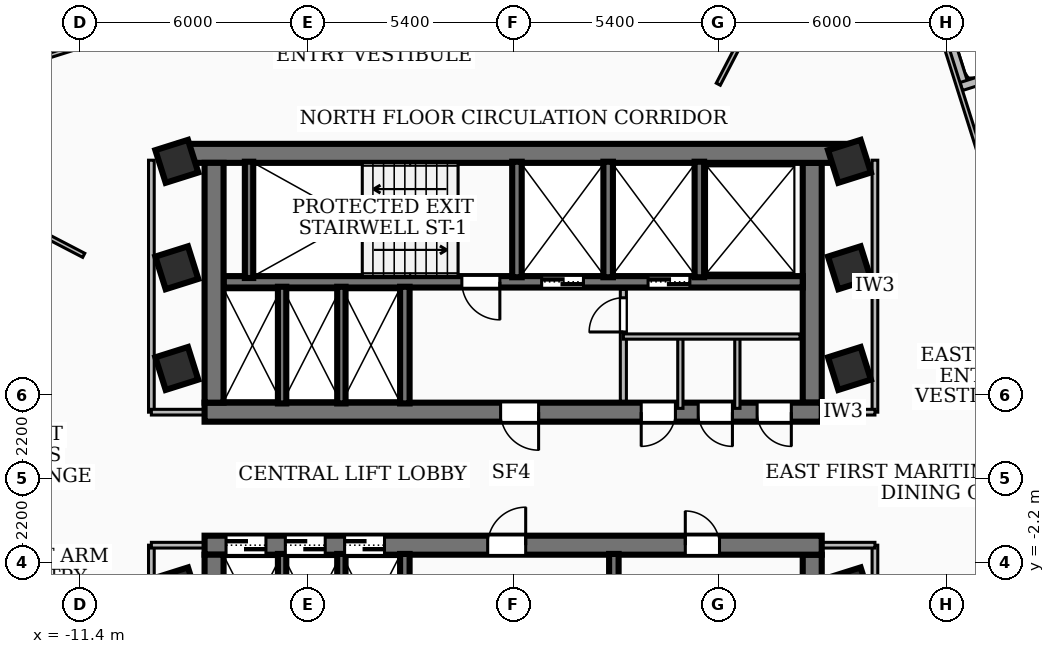
"""IFC4 building model, lengths in metres.
Left out: names, types, materials, properties, quantities, classifications, styles, units other than length and angle.
Written with IfcOpenShell. Run it as: python <this file> out.ifc"""

import sys

from ifc_helpers import new_model, si_unit, direction, frame, frame_2d, origin, origin_2d, place, context, subcontext, project, spatial, rectangle, extrude, element, fill, save


model = new_model("IFC4")
c1 = context("Model", 3, precision=1e-05, world=origin(), true_north=direction((0.0, 1.0)))
c2 = subcontext(c1, "Body", "Model", "MODEL_VIEW")
j1 = project(units=[si_unit("LENGTHUNIT", "METRE"), si_unit("PLANEANGLEUNIT", "RADIAN")], contexts=[c1])
p1 = place(None, origin())
s1 = spatial("IfcSite", under=j1, at=p1, CompositionType="ELEMENT")
p2 = place(p1, origin())
s2 = spatial("IfcBuilding", under=s1, at=p2, CompositionType="ELEMENT")
p3 = place(p2, frame((0.0, 0.0, 152.28)))
s3 = spatial("IfcBuildingStorey", under=s2, at=p3, CompositionType="ELEMENT", Elevation=152.28)
p4 = place(p3, frame((-8.78, 8.56, 0.0), z_axis=(0.0, 0.0, 1.0), x_axis=(1.0, 0.0, 0.0)))
e1 = element("IfcWall", 1, at=p4, inside=s3, PredefinedType="SHEAR", context=c2, shape_type="SweptSolid", body=[
    extrude(rectangle(XDim=17.56, YDim=0.5, at=frame_2d((8.78, 0.0))), origin(), (0.0, 0.0, 1.0), 3.34),
])
p5 = place(p3, frame((8.12, 1.75, 0.0), z_axis=(0.0, 0.0, 1.0), x_axis=(-1.0, 0.0, 0.0)))
e2 = element("IfcWall", 2, at=p5, inside=s3, PredefinedType="SHEAR", context=c2, shape_type="SweptSolid", body=[
    extrude(rectangle(XDim=16.24, YDim=0.5, at=frame_2d((8.12, 0.0))), origin(), (0.0, 0.0, 1.0), 3.34),
])
p6 = place(p5, frame((7.45, 0.0, 0.0)))
e3 = element("IfcOpeningElement", 3, at=p6, cuts=e2, PredefinedType="OPENING", context=c2, shape_type="SweptSolid", body=[
    extrude(rectangle(XDim=1.0, YDim=2.1, at=frame_2d((0.5, 1.05))), frame((0.0, 0.26, 0.0), z_axis=(0.0, -1.0, 0.0), x_axis=(1.0, 0.0, 0.0)), (0.0, 0.0, 1.0), 0.52),
])
p7 = place(p5, frame((3.85, 0.0, 0.0)))
e4 = element("IfcOpeningElement", 4, at=p7, cuts=e2, PredefinedType="OPENING", context=c2, shape_type="SweptSolid", body=[
    extrude(rectangle(XDim=0.9, YDim=2.06, at=frame_2d((0.45, 1.03))), frame((0.0, 0.26, 0.0), z_axis=(0.0, -1.0, 0.0), x_axis=(1.0, 0.0, 0.0)), (0.0, 0.0, 1.0), 0.52),
])
p8 = place(p5, frame((2.35, 0.0, 0.0)))
e5 = element("IfcOpeningElement", 5, at=p8, cuts=e2, PredefinedType="OPENING", context=c2, shape_type="SweptSolid", body=[
    extrude(rectangle(XDim=0.9, YDim=2.06, at=frame_2d((0.45, 1.03))), frame((0.0, 0.26, 0.0), z_axis=(0.0, -1.0, 0.0), x_axis=(1.0, 0.0, 0.0)), (0.0, 0.0, 1.0), 0.52),
])
p9 = place(p5, frame((0.8, 0.0, 0.0)))
e6 = element("IfcOpeningElement", 6, at=p9, cuts=e2, PredefinedType="OPENING", context=c2, shape_type="SweptSolid", body=[
    extrude(rectangle(XDim=0.9, YDim=2.06, at=frame_2d((0.45, 1.03))), frame((0.0, 0.26, 0.0), z_axis=(0.0, -1.0, 0.0), x_axis=(1.0, 0.0, 0.0)), (0.0, 0.0, 1.0), 0.52),
])
for number, where, z_axis, x_axis in (
    (7, (-7.87, 2.0, 0.0), (0.0, 0.0, 1.0), (0.0, 1.0, 0.0)),
    (8, (7.87, 8.31, 0.0), (0.0, 0.0, 1.0), (0.0, -1.0, 0.0)),
):
    element("IfcWall", number, at=place(p3, frame(where, z_axis=z_axis, x_axis=x_axis)), inside=s3, PredefinedType="SHEAR", context=c2, shape_type="SweptSolid", body=[
        extrude(rectangle(XDim=6.31, YDim=0.5, at=frame_2d((3.155, 0.0))), origin(), (0.0, 0.0, 1.0), 3.34),
    ])
p10 = place(p3, frame((7.62, 5.18, 0.0), z_axis=(0.0, 0.0, 1.0), x_axis=(-1.0, 0.0, 0.0)))
e9 = element("IfcWall", 9, at=p10, inside=s3, PredefinedType="SOLIDWALL", context=c2, shape_type="SweptSolid", body=[
    extrude(rectangle(XDim=15.24, YDim=0.3, at=frame_2d((7.62, 0.0))), origin(), (0.0, 0.0, 1.0), 3.34),
])
p11 = place(p10, frame((5.77, 0.0, 0.0)))
e10 = element("IfcOpeningElement", 10, at=p11, cuts=e9, PredefinedType="OPENING", context=c2, shape_type="SweptSolid", body=[
    extrude(rectangle(XDim=1.1, YDim=2.15, at=frame_2d((0.55, 1.075))), frame((0.0, 0.16, 0.0), z_axis=(0.0, -1.0, 0.0), x_axis=(1.0, 0.0, 0.0)), (0.0, 0.0, 1.0), 0.32),
])
p12 = place(p10, frame((2.97, 0.0, 0.0)))
e11 = element("IfcOpeningElement", 11, at=p12, cuts=e9, PredefinedType="OPENING", context=c2, shape_type="SweptSolid", body=[
    extrude(rectangle(XDim=1.1, YDim=2.15, at=frame_2d((0.55, 1.075))), frame((0.0, 0.16, 0.0), z_axis=(0.0, -1.0, 0.0), x_axis=(1.0, 0.0, 0.0)), (0.0, 0.0, 1.0), 0.32),
])
p13 = place(p10, frame((7.97, 0.0, 0.0)))
e12 = element("IfcOpeningElement", 12, at=p13, cuts=e9, PredefinedType="OPENING", context=c2, shape_type="SweptSolid", body=[
    extrude(rectangle(XDim=1.0, YDim=2.1, at=frame_2d((0.5, 1.05))), frame((0.0, 0.16, 0.0), z_axis=(0.0, -1.0, 0.0), x_axis=(1.0, 0.0, 0.0)), (0.0, 0.0, 1.0), 0.32),
])
p14 = place(p3, frame((-8.12, -1.75, 0.0), z_axis=(0.0, 0.0, 1.0), x_axis=(1.0, 0.0, 0.0)))
e13 = element("IfcWall", 13, at=p14, inside=s3, PredefinedType="SHEAR", context=c2, shape_type="SweptSolid", body=[
    extrude(rectangle(XDim=16.24, YDim=0.5, at=frame_2d((8.12, 0.0))), origin(), (0.0, 0.0, 1.0), 3.34),
])
p15 = place(p14, frame((7.45, 0.0, 0.0)))
e14 = element("IfcOpeningElement", 14, at=p15, cuts=e13, PredefinedType="OPENING", context=c2, shape_type="SweptSolid", body=[
    extrude(rectangle(XDim=1.0, YDim=2.1, at=frame_2d((0.5, 1.05))), frame((0.0, 0.26, 0.0), z_axis=(0.0, -1.0, 0.0), x_axis=(1.0, 0.0, 0.0)), (0.0, 0.0, 1.0), 0.52),
])
p16 = place(p14, frame((12.65, 0.0, 0.0)))
e15 = element("IfcOpeningElement", 15, at=p16, cuts=e13, PredefinedType="OPENING", context=c2, shape_type="SweptSolid", body=[
    extrude(rectangle(XDim=0.9, YDim=2.06, at=frame_2d((0.45, 1.03))), frame((0.0, 0.26, 0.0), z_axis=(0.0, -1.0, 0.0), x_axis=(1.0, 0.0, 0.0)), (0.0, 0.0, 1.0), 0.52),
])
p17 = place(p14, frame((0.565, 0.0, 0.0)))
e16 = element("IfcOpeningElement", 16, at=p17, cuts=e13, PredefinedType="OPENING", context=c2, shape_type="SweptSolid", body=[
    extrude(rectangle(XDim=1.05, YDim=2.15, at=frame_2d((0.525, 1.075))), frame((0.0, 0.26, 0.0), z_axis=(0.0, -1.0, 0.0), x_axis=(1.0, 0.0, 0.0)), (0.0, 0.0, 1.0), 0.52),
])
p18 = place(p14, frame((2.125, 0.0, 0.0)))
e17 = element("IfcOpeningElement", 17, at=p18, cuts=e13, PredefinedType="OPENING", context=c2, shape_type="SweptSolid", body=[
    extrude(rectangle(XDim=1.05, YDim=2.15, at=frame_2d((0.525, 1.075))), frame((0.0, 0.26, 0.0), z_axis=(0.0, -1.0, 0.0), x_axis=(1.0, 0.0, 0.0)), (0.0, 0.0, 1.0), 0.52),
])
p19 = place(p14, frame((3.685, 0.0, 0.0)))
e18 = element("IfcOpeningElement", 18, at=p19, cuts=e13, PredefinedType="OPENING", context=c2, shape_type="SweptSolid", body=[
    extrude(rectangle(XDim=1.05, YDim=2.15, at=frame_2d((0.525, 1.075))), frame((0.0, 0.26, 0.0), z_axis=(0.0, -1.0, 0.0), x_axis=(1.0, 0.0, 0.0)), (0.0, 0.0, 1.0), 0.52),
])
for number, where, z_axis, x_axis in (
    (19, (-7.87, -8.31, 0.0), (0.0, 0.0, 1.0), (0.0, 1.0, 0.0)),
    (20, (7.87, -2.0, 0.0), (0.0, 0.0, 1.0), (0.0, -1.0, 0.0)),
):
    element("IfcWall", number, at=place(p3, frame(where, z_axis=z_axis, x_axis=x_axis)), inside=s3, PredefinedType="SHEAR", context=c2, shape_type="SweptSolid", body=[
        extrude(rectangle(XDim=6.31, YDim=0.5, at=frame_2d((3.155, 0.0))), origin(), (0.0, 0.0, 1.0), 3.34),
    ])
p20 = place(p3, frame((-6.95, 5.28, 0.0), z_axis=(0.0, 0.0, 1.0), x_axis=(0.0, 1.0, 0.0)))
e21 = element("IfcWall", 21, at=p20, inside=s3, PredefinedType="SOLIDWALL", context=c2, shape_type="SweptSolid", body=[
    extrude(rectangle(XDim=3.06, YDim=0.22, at=frame_2d((1.53, 0.0))), origin(), (0.0, 0.0, 1.0), 3.34),
])
for number, where, z_axis, x_axis in (
    (22, (0.1, 5.3, 0.0), (0.0, 0.0, 1.0), (0.0, 1.0, 0.0)),
    (23, (2.5, 5.3, 0.0), (0.0, 0.0, 1.0), (0.0, 1.0, 0.0)),
    (24, (4.9, 5.3, 0.0), (0.0, 0.0, 1.0), (0.0, 1.0, 0.0)),
):
    element("IfcWall", number, at=place(p3, frame(where, z_axis=z_axis, x_axis=x_axis)), inside=s3, PredefinedType="SOLIDWALL", context=c2, shape_type="SweptSolid", body=[
        extrude(rectangle(XDim=3.04, YDim=0.25, at=frame_2d((1.52, 0.0))), origin(), (0.0, 0.0, 1.0), 3.34),
    ])
for number, where, z_axis, x_axis in (
    (25, (-2.85, 1.98, 0.0), (0.0, 0.0, 1.0), (0.0, 1.0, 0.0)),
    (26, (-2.85, -5.05, 0.0), (0.0, 0.0, 1.0), (0.0, 1.0, 0.0)),
    (27, (2.65, -5.05, 0.0), (0.0, 0.0, 1.0), (0.0, 1.0, 0.0)),
):
    element("IfcWall", number, at=place(p3, frame(where, z_axis=z_axis, x_axis=x_axis)), inside=s3, PredefinedType="SOLIDWALL", context=c2, shape_type="SweptSolid", body=[
        extrude(rectangle(XDim=3.07, YDim=0.25, at=frame_2d((1.535, 0.0))), origin(), (0.0, 0.0, 1.0), 3.34),
    ])
for number, where, z_axis, x_axis in (
    (28, (-6.08, 1.98, 0.0), (0.0, 0.0, 1.0), (0.0, 1.0, 0.0)),
    (29, (-4.52, 1.98, 0.0), (0.0, 0.0, 1.0), (0.0, 1.0, 0.0)),
    (30, (-6.08, -5.05, 0.0), (0.0, 0.0, 1.0), (0.0, 1.0, 0.0)),
    (31, (-4.52, -5.05, 0.0), (0.0, 0.0, 1.0), (0.0, 1.0, 0.0)),
):
    element("IfcWall", number, at=place(p3, frame(where, z_axis=z_axis, x_axis=x_axis)), inside=s3, PredefinedType="SOLIDWALL", context=c2, shape_type="SweptSolid", body=[
        extrude(rectangle(XDim=3.07, YDim=0.22, at=frame_2d((1.535, 0.0))), origin(), (0.0, 0.0, 1.0), 3.34),
    ])
for number, where, z_axis, x_axis in (
    (32, (-8.85, -2.9, 0.0), (0.0, 0.0, 1.0), (0.954, 0.301, 0.0)),
    (33, (-8.85, 2.9, 0.0), (0.0, 0.0, 1.0), (0.954, 0.301, 0.0)),
    (34, (-8.85, 5.55, 0.0), (0.0, 0.0, 1.0), (0.954, 0.301, 0.0)),
    (35, (8.85, -2.9, 0.0), (0.0, 0.0, 1.0), (0.954, 0.301, 0.0)),
    (36, (8.85, 2.9, 0.0), (0.0, 0.0, 1.0), (0.954, 0.301, 0.0)),
    (37, (8.85, 5.55, 0.0), (0.0, 0.0, 1.0), (0.954, 0.301, 0.0)),
    (38, (-8.85, 8.35, 0.0), (0.0, 0.0, 1.0), (0.954, 0.301, 0.0)),
    (39, (8.85, 8.35, 0.0), (0.0, 0.0, 1.0), (0.954, 0.301, 0.0)),
):
    element("IfcColumn", number, at=place(p3, frame(where, z_axis=z_axis, x_axis=x_axis)), inside=s3, PredefinedType="COLUMN", context=c2, shape_type="SweptSolid", body=[
        extrude(rectangle(XDim=0.9, YDim=0.9, at=origin_2d()), origin(), (0.0, 0.0, 1.0), 3.6),
    ])
p21 = place(p3, frame((-16.706, 9.868, 0.0), z_axis=(0.0, 0.0, 1.0), x_axis=(0.953629605256, 0.300982683852, 0.0)))
e40 = element("IfcWall", 40, at=p21, inside=s3, PredefinedType="SOLIDWALL", context=c2, shape_type="SweptSolid", body=[
    extrude(rectangle(XDim=6.759, YDim=0.22, at=frame_2d((3.379, 0.0))), origin(), (0.0, 0.0, 1.0), 3.34),
])
p22 = place(p3, frame((9.868, 16.706, 0.0), z_axis=(0.0, 0.0, 1.0), x_axis=(0.300982683852, -0.953629605256, 0.0)))
e41 = element("IfcWall", 41, at=p22, inside=s3, PredefinedType="SOLIDWALL", context=c2, shape_type="SweptSolid", body=[
    extrude(rectangle(XDim=6.759, YDim=0.22, at=frame_2d((3.379, 0.0))), origin(), (0.0, 0.0, 1.0), 2.152),
])
p23 = place(p3, frame((11.792, 10.319, 0.0), z_axis=(0.0, 0.0, 1.0), x_axis=(0.953607060649, 0.301054104573, 0.0)))
e42 = element("IfcWall", 42, at=p23, inside=s3, PredefinedType="SOLIDWALL", context=c2, shape_type="SweptSolid", body=[
    extrude(rectangle(XDim=13.459, YDim=0.22, at=frame_2d((6.73, 0.0))), origin(), (0.0, 0.0, 1.0), 2.152),
])
p24 = place(p3, frame((2.9, 2.04, 0.0), z_axis=(0.0, 0.0, 1.0), x_axis=(0.0, 1.0, 0.0)))
e43 = element("IfcWall", 43, at=p24, inside=s3, PredefinedType="PARTITIONING", context=c2, shape_type="SweptSolid", body=[
    extrude(rectangle(XDim=2.94, YDim=0.16, at=frame_2d((1.47, 0.0))), origin(), (0.0, 0.0, 1.0), 2.57),
])
p25 = place(p24, frame((1.82, 0.0, 0.0)))
e44 = element("IfcOpeningElement", 44, at=p25, cuts=e43, PredefinedType="OPENING", context=c2, shape_type="SweptSolid", body=[
    extrude(rectangle(XDim=0.9, YDim=2.06, at=frame_2d((0.45, 1.03))), frame((0.0, 0.09, 0.0), z_axis=(0.0, -1.0, 0.0), x_axis=(1.0, 0.0, 0.0)), (0.0, 0.0, 1.0), 0.18),
])
p26 = place(p3, frame((2.9, 3.74, 0.0), z_axis=(0.0, 0.0, 1.0), x_axis=(1.0, 0.0, 0.0)))
e45 = element("IfcWall", 45, at=p26, inside=s3, PredefinedType="PARTITIONING", context=c2, shape_type="SweptSolid", body=[
    extrude(rectangle(XDim=4.65, YDim=0.138, at=frame_2d((2.325, 0.0))), origin(), (0.0, 0.0, 1.0), 3.34),
])
for number, where, z_axis, x_axis in (
    (46, (4.4, 1.85, 0.0), (0.0, 0.0, 1.0), (0.0, 1.0, 0.0)),
    (47, (5.9, 1.85, 0.0), (0.0, 0.0, 1.0), (0.0, 1.0, 0.0)),
):
    element("IfcWall", number, at=place(p3, frame(where, z_axis=z_axis, x_axis=x_axis)), inside=s3, PredefinedType="PARTITIONING", context=c2, shape_type="SweptSolid", body=[
        extrude(rectangle(XDim=1.89, YDim=0.138, at=frame_2d((0.945, 0.0))), origin(), (0.0, 0.0, 1.0), 2.57),
    ])
p27 = place(p3, frame((-9.52, 1.75, 0.0), z_axis=(0.0, 0.0, 1.0), x_axis=(0.0, 1.0, 0.0)))
e48 = element("IfcWall", 48, at=p27, inside=s3, PredefinedType="PARTITIONING", context=c2, shape_type="SweptSolid", body=[
    extrude(rectangle(XDim=6.63, YDim=0.15, at=frame_2d((3.315, 0.0))), origin(), (0.0, 0.0, 1.0), 2.152),
])
p28 = place(p3, frame((-7.85, 1.75, 0.0), z_axis=(0.0, 0.0, 1.0), x_axis=(-1.0, 0.0, 0.0)))
e49 = element("IfcWall", 49, at=p28, inside=s3, PredefinedType="PARTITIONING", context=c2, shape_type="SweptSolid", body=[
    extrude(rectangle(XDim=1.67, YDim=0.15, at=frame_2d((0.835, 0.0))), origin(), (0.0, 0.0, 1.0), 2.57),
])
p29 = place(p3, frame((-9.52, -8.38, 0.0), z_axis=(0.0, 0.0, 1.0), x_axis=(0.0, 1.0, 0.0)))
e50 = element("IfcWall", 50, at=p29, inside=s3, PredefinedType="PARTITIONING", context=c2, shape_type="SweptSolid", body=[
    extrude(rectangle(XDim=6.63, YDim=0.15, at=frame_2d((3.315, 0.0))), origin(), (0.0, 0.0, 1.0), 2.152),
])
p30 = place(p3, frame((-7.85, -1.75, 0.0), z_axis=(0.0, 0.0, 1.0), x_axis=(-1.0, 0.0, 0.0)))
e51 = element("IfcWall", 51, at=p30, inside=s3, PredefinedType="PARTITIONING", context=c2, shape_type="SweptSolid", body=[
    extrude(rectangle(XDim=1.67, YDim=0.15, at=frame_2d((0.835, 0.0))), origin(), (0.0, 0.0, 1.0), 2.57),
])
p31 = place(p3, frame((9.52, 1.75, 0.0), z_axis=(0.0, 0.0, 1.0), x_axis=(0.0, 1.0, 0.0)))
e52 = element("IfcWall", 52, at=p31, inside=s3, PredefinedType="PARTITIONING", context=c2, shape_type="SweptSolid", body=[
    extrude(rectangle(XDim=6.63, YDim=0.15, at=frame_2d((3.315, 0.0))), origin(), (0.0, 0.0, 1.0), 2.152),
])
p32 = place(p3, frame((7.85, 1.75, 0.0), z_axis=(0.0, 0.0, 1.0), x_axis=(1.0, 0.0, 0.0)))
e53 = element("IfcWall", 53, at=p32, inside=s3, PredefinedType="PARTITIONING", context=c2, shape_type="SweptSolid", body=[
    extrude(rectangle(XDim=1.67, YDim=0.15, at=frame_2d((0.835, 0.0))), origin(), (0.0, 0.0, 1.0), 2.57),
])
p33 = place(p3, frame((9.52, -8.38, 0.0), z_axis=(0.0, 0.0, 1.0), x_axis=(0.0, 1.0, 0.0)))
e54 = element("IfcWall", 54, at=p33, inside=s3, PredefinedType="PARTITIONING", context=c2, shape_type="SweptSolid", body=[
    extrude(rectangle(XDim=6.63, YDim=0.15, at=frame_2d((3.315, 0.0))), origin(), (0.0, 0.0, 1.0), 2.152),
])
p34 = place(p3, frame((7.85, -1.75, 0.0), z_axis=(0.0, 0.0, 1.0), x_axis=(1.0, 0.0, 0.0)))
e55 = element("IfcWall", 55, at=p34, inside=s3, PredefinedType="PARTITIONING", context=c2, shape_type="SweptSolid", body=[
    extrude(rectangle(XDim=1.67, YDim=0.15, at=frame_2d((0.835, 0.0))), origin(), (0.0, 0.0, 1.0), 2.57),
])
p35 = place(p3, frame((5.398, 10.38, 0.0), z_axis=(0.0, 0.0, 1.0), x_axis=(0.461434665806, 0.887174193263, 0.0)))
e56 = element("IfcWall", 56, at=p35, inside=s3, PredefinedType="PARTITIONING", context=c2, shape_type="SweptSolid", body=[
    extrude(rectangle(XDim=7.975, YDim=0.12, at=frame_2d((3.988, 0.0))), origin(), (0.0, 0.0, 1.0), 2.152),
])
p36 = place(p3, frame((-11.3, 5.877, 0.0), z_axis=(0.0, 0.0, 1.0), x_axis=(-0.887198362964, 0.461388193123, 0.0)))
e57 = element("IfcWall", 57, at=p36, inside=s3, PredefinedType="PARTITIONING", context=c2, shape_type="SweptSolid", body=[
    extrude(rectangle(XDim=6.938, YDim=0.12, at=frame_2d((3.469, 0.0))), origin(), (0.0, 0.0, 1.0), 3.34),
])
p37 = place(p3, frame((10.379, 14.591, 0.0), z_axis=(0.0, 0.0, 1.0), x_axis=(0.301070726534, -0.95360181293, 0.0)))
e58 = element("IfcWall", 58, at=p37, inside=s3, PredefinedType="PARTITIONING", context=c2, shape_type="SweptSolid", body=[
    extrude(rectangle(XDim=20.81, YDim=0.12, at=frame_2d((10.405, 0.0))), origin(), (0.0, 0.0, 1.0), 2.152),
])
p38 = place(p37, frame((10.189, 0.0, 0.0)))
e59 = element("IfcOpeningElement", 59, at=p38, cuts=e58, PredefinedType="OPENING", context=c2, shape_type="SweptSolid", body=[
    extrude(rectangle(XDim=0.86, YDim=2.0, at=frame_2d((0.43, 1.0))), frame((0.0, 0.07, 0.0), z_axis=(0.0, -1.0, 0.0), x_axis=(1.0, 0.0, 0.0)), (0.0, 0.0, 1.0), 0.14),
])
p39 = place(p3, frame((-14.591, 10.379, 0.0), z_axis=(0.0, 0.0, 1.0), x_axis=(0.95360181293, 0.301070726534, 0.0)))
e60 = element("IfcWall", 60, at=p39, inside=s3, PredefinedType="PARTITIONING", context=c2, shape_type="SweptSolid", body=[
    extrude(rectangle(XDim=20.81, YDim=0.12, at=frame_2d((10.405, 0.0))), origin(), (0.0, 0.0, 1.0), 2.152),
])
p40 = place(p39, frame((10.189, 0.0, 0.0)))
e61 = element("IfcOpeningElement", 61, at=p40, cuts=e60, PredefinedType="OPENING", context=c2, shape_type="SweptSolid", body=[
    extrude(rectangle(XDim=0.86, YDim=2.0, at=frame_2d((0.43, 1.0))), frame((0.0, 0.07, 0.0), z_axis=(0.0, -1.0, 0.0), x_axis=(1.0, 0.0, 0.0)), (0.0, 0.0, 1.0), 0.14),
])
p41 = place(p3, frame((-10.379, -14.591, 0.0), z_axis=(0.0, 0.0, 1.0), x_axis=(-0.301070726534, 0.95360181293, 0.0)))
e62 = element("IfcWall", 62, at=p41, inside=s3, PredefinedType="PARTITIONING", context=c2, shape_type="SweptSolid", body=[
    extrude(rectangle(XDim=20.81, YDim=0.12, at=frame_2d((10.405, 0.0))), origin(), (0.0, 0.0, 1.0), 2.152),
])
p42 = place(p41, frame((10.189, 0.0, 0.0)))
e63 = element("IfcOpeningElement", 63, at=p42, cuts=e62, PredefinedType="OPENING", context=c2, shape_type="SweptSolid", body=[
    extrude(rectangle(XDim=0.86, YDim=2.0, at=frame_2d((0.43, 1.0))), frame((0.0, 0.07, 0.0), z_axis=(0.0, -1.0, 0.0), x_axis=(1.0, 0.0, 0.0)), (0.0, 0.0, 1.0), 0.14),
])
p43 = place(p6, origin())
e64 = element("IfcDoor", 64, at=p43, inside=s3, OperationType="SINGLE_SWING_LEFT", PredefinedType="DOOR", context=c2, shape_type="SweptSolid", body=[
    extrude(rectangle(XDim=1.0, YDim=2.1, at=frame_2d((0.5, 1.05))), frame((0.0, 0.025, 0.0), z_axis=(0.0, -1.0, 0.0), x_axis=(1.0, 0.0, 0.0)), (0.0, 0.0, 1.0), 0.05),
])
fill(e3, e64)
p44 = place(p15, origin())
e65 = element("IfcDoor", 65, at=p44, inside=s3, OperationType="SINGLE_SWING_RIGHT", PredefinedType="DOOR", context=c2, shape_type="SweptSolid", body=[
    extrude(rectangle(XDim=1.0, YDim=2.1, at=frame_2d((0.5, 1.05))), frame((0.0, 0.025, 0.0), z_axis=(0.0, -1.0, 0.0), x_axis=(1.0, 0.0, 0.0)), (0.0, 0.0, 1.0), 0.05),
])
fill(e14, e65)
p45 = place(p11, origin())
e66 = element("IfcDoor", 66, at=p45, inside=s3, OperationType="DOUBLE_DOOR_SLIDING", PredefinedType="DOOR", context=c2, shape_type="SweptSolid", body=[
    extrude(rectangle(XDim=1.1, YDim=2.15, at=frame_2d((0.55, 1.075))), frame((0.0, 0.025, 0.0), z_axis=(0.0, -1.0, 0.0), x_axis=(1.0, 0.0, 0.0)), (0.0, 0.0, 1.0), 0.05),
])
fill(e10, e66)
p46 = place(p12, origin())
e67 = element("IfcDoor", 67, at=p46, inside=s3, OperationType="DOUBLE_DOOR_SLIDING", PredefinedType="DOOR", context=c2, shape_type="SweptSolid", body=[
    extrude(rectangle(XDim=1.1, YDim=2.15, at=frame_2d((0.55, 1.075))), frame((0.0, 0.025, 0.0), z_axis=(0.0, -1.0, 0.0), x_axis=(1.0, 0.0, 0.0)), (0.0, 0.0, 1.0), 0.05),
])
fill(e11, e67)
p47 = place(p13, origin())
e68 = element("IfcDoor", 68, at=p47, inside=s3, OperationType="SINGLE_SWING_LEFT", PredefinedType="DOOR", context=c2, shape_type="SweptSolid", body=[
    extrude(rectangle(XDim=1.0, YDim=2.1, at=frame_2d((0.5, 1.05))), frame((0.0, 0.025, 0.0), z_axis=(0.0, -1.0, 0.0), x_axis=(1.0, 0.0, 0.0)), (0.0, 0.0, 1.0), 0.05),
])
fill(e12, e68)
p48 = place(p16, origin())
e69 = element("IfcDoor", 69, at=p48, inside=s3, OperationType="SINGLE_SWING_LEFT", PredefinedType="DOOR", context=c2, shape_type="SweptSolid", body=[
    extrude(rectangle(XDim=0.9, YDim=2.06, at=frame_2d((0.45, 1.03))), frame((0.0, 0.025, 0.0), z_axis=(0.0, -1.0, 0.0), x_axis=(1.0, 0.0, 0.0)), (0.0, 0.0, 1.0), 0.05),
])
fill(e15, e69)
p49 = place(p17, origin())
e70 = element("IfcDoor", 70, at=p49, inside=s3, OperationType="DOUBLE_DOOR_SLIDING", PredefinedType="DOOR", context=c2, shape_type="SweptSolid", body=[
    extrude(rectangle(XDim=1.05, YDim=2.15, at=frame_2d((0.525, 1.075))), frame((0.0, 0.025, 0.0), z_axis=(0.0, -1.0, 0.0), x_axis=(1.0, 0.0, 0.0)), (0.0, 0.0, 1.0), 0.05),
])
fill(e16, e70)
p50 = place(p18, origin())
e71 = element("IfcDoor", 71, at=p50, inside=s3, OperationType="DOUBLE_DOOR_SLIDING", PredefinedType="DOOR", context=c2, shape_type="SweptSolid", body=[
    extrude(rectangle(XDim=1.05, YDim=2.15, at=frame_2d((0.525, 1.075))), frame((0.0, 0.025, 0.0), z_axis=(0.0, -1.0, 0.0), x_axis=(1.0, 0.0, 0.0)), (0.0, 0.0, 1.0), 0.05),
])
fill(e17, e71)
p51 = place(p19, origin())
e72 = element("IfcDoor", 72, at=p51, inside=s3, OperationType="DOUBLE_DOOR_SLIDING", PredefinedType="DOOR", context=c2, shape_type="SweptSolid", body=[
    extrude(rectangle(XDim=1.05, YDim=2.15, at=frame_2d((0.525, 1.075))), frame((0.0, 0.025, 0.0), z_axis=(0.0, -1.0, 0.0), x_axis=(1.0, 0.0, 0.0)), (0.0, 0.0, 1.0), 0.05),
])
fill(e18, e72)
p52 = place(p7, origin())
e73 = element("IfcDoor", 73, at=p52, inside=s3, OperationType="SINGLE_SWING_RIGHT", PredefinedType="DOOR", context=c2, shape_type="SweptSolid", body=[
    extrude(rectangle(XDim=0.9, YDim=2.06, at=frame_2d((0.45, 1.03))), frame((0.0, 0.025, 0.0), z_axis=(0.0, -1.0, 0.0), x_axis=(1.0, 0.0, 0.0)), (0.0, 0.0, 1.0), 0.05),
])
fill(e4, e73)
p53 = place(p8, origin())
e74 = element("IfcDoor", 74, at=p53, inside=s3, OperationType="SINGLE_SWING_LEFT", PredefinedType="DOOR", context=c2, shape_type="SweptSolid", body=[
    extrude(rectangle(XDim=0.9, YDim=2.06, at=frame_2d((0.45, 1.03))), frame((0.0, 0.025, 0.0), z_axis=(0.0, -1.0, 0.0), x_axis=(1.0, 0.0, 0.0)), (0.0, 0.0, 1.0), 0.05),
])
fill(e5, e74)
p54 = place(p9, origin())
e75 = element("IfcDoor", 75, at=p54, inside=s3, OperationType="SINGLE_SWING_LEFT", PredefinedType="DOOR", context=c2, shape_type="SweptSolid", body=[
    extrude(rectangle(XDim=0.9, YDim=2.06, at=frame_2d((0.45, 1.03))), frame((0.0, 0.025, 0.0), z_axis=(0.0, -1.0, 0.0), x_axis=(1.0, 0.0, 0.0)), (0.0, 0.0, 1.0), 0.05),
])
fill(e6, e75)
p55 = place(p25, origin())
e76 = element("IfcDoor", 76, at=p55, inside=s3, OperationType="SINGLE_SWING_LEFT", PredefinedType="DOOR", context=c2, shape_type="SweptSolid", body=[
    extrude(rectangle(XDim=0.9, YDim=2.06, at=frame_2d((0.45, 1.03))), frame((0.0, 0.025, 0.0), z_axis=(0.0, -1.0, 0.0), x_axis=(1.0, 0.0, 0.0)), (0.0, 0.0, 1.0), 0.05),
])
fill(e44, e76)
save(model, sys.argv[1])
